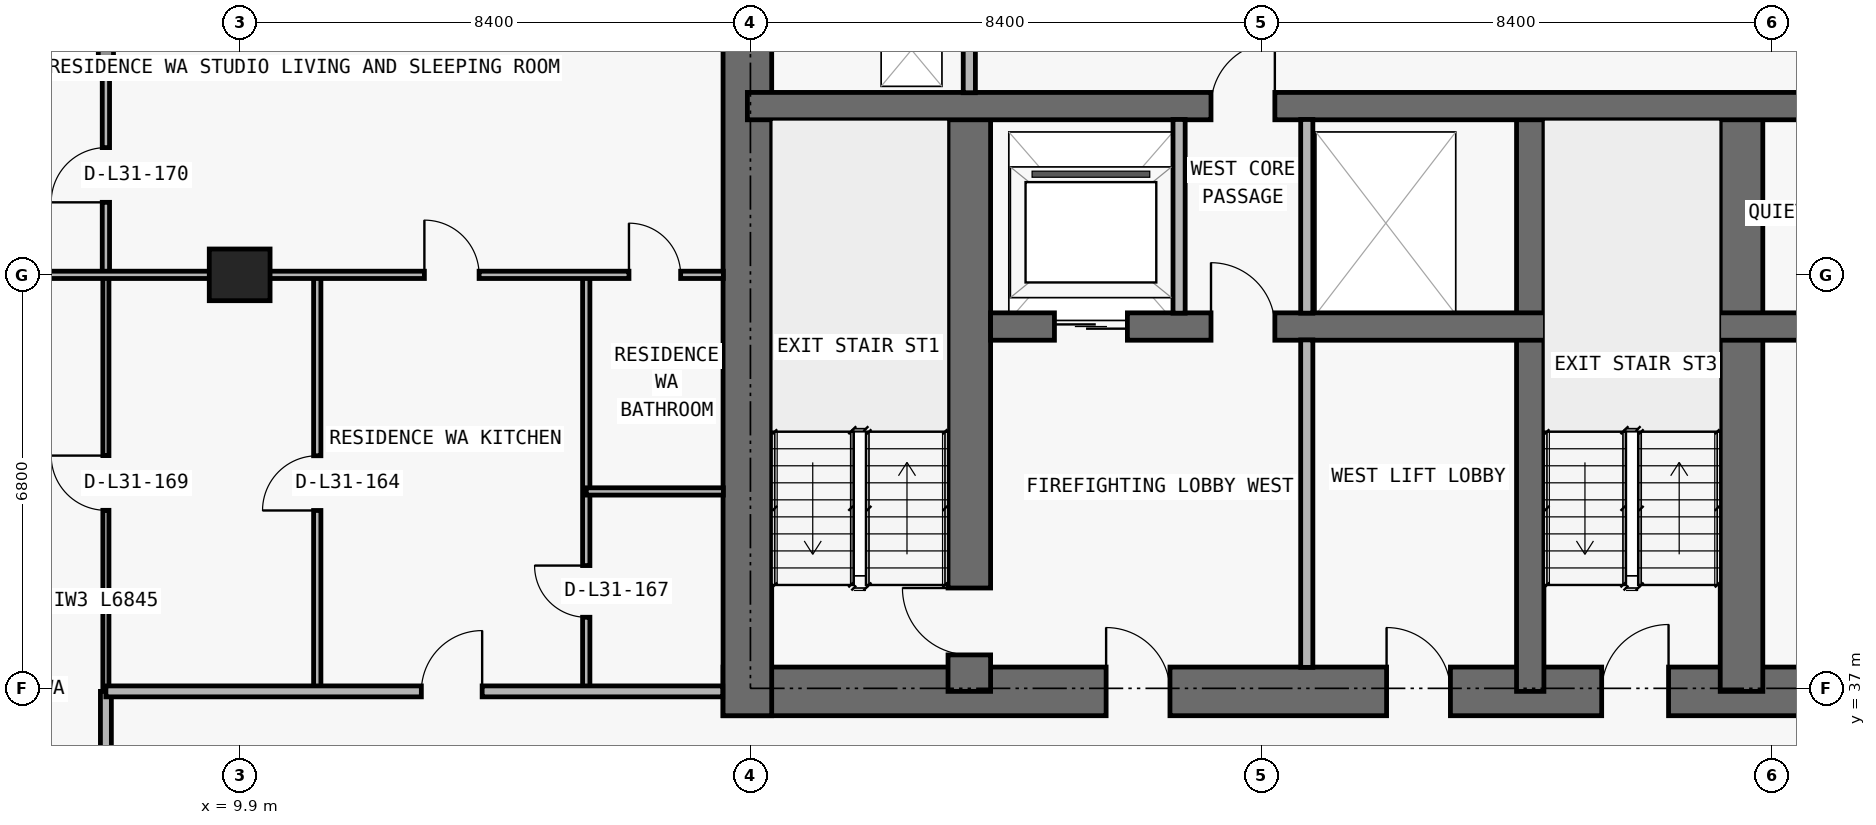
"""IFC4 building model, lengths in metres.
Left out: names, types, materials, properties, quantities, classifications, styles, units other than length and angle.
Written with IfcOpenShell. Run it as: python <this file> out.ifc"""

import sys

from ifc_helpers import new_model, si_unit, direction, frame, frame_2d, origin, origin_2d, place, context, subcontext, project, spatial, rectangle, extrude, element, fill, save


model = new_model("IFC4")
c1 = context("Model", 3, precision=1e-05, world=origin(), true_north=direction((0.0, 1.0)))
c2 = subcontext(c1, "Body", "Model", "MODEL_VIEW")
j1 = project(units=[si_unit("LENGTHUNIT", "METRE"), si_unit("PLANEANGLEUNIT", "RADIAN")], contexts=[c1])
p1 = place(None, origin())
s1 = spatial("IfcSite", under=j1, at=p1, CompositionType="ELEMENT")
p2 = place(p1, origin())
s2 = spatial("IfcBuilding", under=s1, at=p2, CompositionType="ELEMENT")
p3 = place(p2, frame((0.0, 0.0, 115.8)))
s3 = spatial("IfcBuildingStorey", under=s2, at=p3, CompositionType="ELEMENT", Elevation=115.8)
p4 = place(p3, frame((9.9, 43.8, 0.0), z_axis=(0.0, 0.0, 1.0), x_axis=(1.0, 0.0, 0.0)))
e1 = element("IfcColumn", 1, at=p4, inside=s3, PredefinedType="COLUMN", context=c2, shape_type="SweptSolid", body=[
    extrude(rectangle(XDim=1.0, YDim=0.85, at=origin_2d()), origin(), (0.0, 0.0, 1.0), 3.05),
])
p5 = place(p3, frame((17.85, 36.95, 0.0), z_axis=(0.0, 0.0, 1.0), x_axis=(1.0, 0.0, 0.0)))
e2 = element("IfcWall", 2, at=p5, inside=s3, PredefinedType="SHEAR", context=c2, shape_type="SweptSolid", body=[
    extrude(rectangle(XDim=42.1, YDim=0.8, at=frame_2d((21.05, 0.0))), origin(), (0.0, 0.0, 1.0), 3.05),
])
p6 = place(p5, frame((14.45, 0.0, 0.0)))
e3 = element("IfcOpeningElement", 3, at=p6, cuts=e2, PredefinedType="OPENING", context=c2, shape_type="SweptSolid", body=[
    extrude(rectangle(XDim=1.1, YDim=2.15, at=frame_2d((0.55, 1.075))), frame((0.0, 0.41, 0.0), z_axis=(0.0, -1.0, 0.0), x_axis=(1.0, 0.0, 0.0)), (0.0, 0.0, 1.0), 0.82),
])
p7 = place(p5, frame((6.3, 0.0, 0.0)))
e4 = element("IfcOpeningElement", 4, at=p7, cuts=e2, PredefinedType="OPENING", context=c2, shape_type="SweptSolid", body=[
    extrude(rectangle(XDim=1.05, YDim=2.15, at=frame_2d((0.525, 1.075))), frame((0.0, 0.41, 0.0), z_axis=(0.0, -1.0, 0.0), x_axis=(1.0, 0.0, 0.0)), (0.0, 0.0, 1.0), 0.82),
])
p8 = place(p5, frame((34.8, 0.0, 0.0)))
e5 = element("IfcOpeningElement", 5, at=p8, cuts=e2, PredefinedType="OPENING", context=c2, shape_type="SweptSolid", body=[
    extrude(rectangle(XDim=1.05, YDim=2.15, at=frame_2d((0.525, 1.075))), frame((0.0, 0.41, 0.0), z_axis=(0.0, -1.0, 0.0), x_axis=(1.0, 0.0, 0.0)), (0.0, 0.0, 1.0), 0.82),
])
p9 = place(p5, frame((10.913, 0.0, 0.0)))
e6 = element("IfcOpeningElement", 6, at=p9, cuts=e2, PredefinedType="OPENING", context=c2, shape_type="SweptSolid", body=[
    extrude(rectangle(XDim=1.05, YDim=2.15, at=frame_2d((0.525, 1.075))), frame((0.0, 0.41, 0.0), z_axis=(0.0, -1.0, 0.0), x_axis=(1.0, 0.0, 0.0)), (0.0, 0.0, 1.0), 0.82),
])
p10 = place(p5, frame((24.15, 0.0, 0.0)))
e7 = element("IfcOpeningElement", 7, at=p10, cuts=e2, PredefinedType="OPENING", context=c2, shape_type="SweptSolid", body=[
    extrude(rectangle(XDim=1.05, YDim=2.15, at=frame_2d((0.525, 1.075))), frame((0.0, 0.41, 0.0), z_axis=(0.0, -1.0, 0.0), x_axis=(1.0, 0.0, 0.0)), (0.0, 0.0, 1.0), 0.82),
])
p11 = place(p3, frame((18.25, 36.55, 0.0), z_axis=(0.0, 0.0, 1.0), x_axis=(0.0, 1.0, 0.0)))
e8 = element("IfcWall", 8, at=p11, inside=s3, PredefinedType="SHEAR", context=c2, shape_type="SweptSolid", body=[
    extrude(rectangle(XDim=14.05, YDim=0.8, at=frame_2d((7.025, 0.0))), origin(), (0.0, 0.0, 1.0), 3.05),
])
p12 = place(p3, frame((21.9, 36.95, 0.0), z_axis=(0.0, 0.0, 1.0), x_axis=(0.0, 1.0, 0.0)))
e9 = element("IfcWall", 9, at=p12, inside=s3, PredefinedType="SHEAR", context=c2, shape_type="SweptSolid", body=[
    extrude(rectangle(XDim=9.625, YDim=0.7, at=frame_2d((4.812, 0.0))), origin(), (0.0, 0.0, 1.0), 3.05),
])
p13 = place(p12, frame((0.6, 0.0, 0.0)))
e10 = element("IfcOpeningElement", 10, at=p13, cuts=e9, PredefinedType="OPENING", context=c2, shape_type="SweptSolid", body=[
    extrude(rectangle(XDim=1.1, YDim=2.15, at=frame_2d((0.55, 1.075))), frame((0.0, 0.36, 0.0), z_axis=(0.0, -1.0, 0.0), x_axis=(1.0, 0.0, 0.0)), (0.0, 0.0, 1.0), 0.72),
])
p14 = place(p3, frame((31.125, 36.95, 0.0), z_axis=(0.0, 0.0, 1.0), x_axis=(0.0, 1.0, 0.0)))
e11 = element("IfcWall", 11, at=p14, inside=s3, PredefinedType="SHEAR", context=c2, shape_type="SweptSolid", body=[
    extrude(rectangle(XDim=9.625, YDim=0.45, at=frame_2d((4.812, 0.0))), origin(), (0.0, 0.0, 1.0), 3.05),
])
p15 = place(p3, frame((34.6, 36.95, 0.0), z_axis=(0.0, 0.0, 1.0), x_axis=(0.0, 1.0, 0.0)))
e12 = element("IfcWall", 12, at=p15, inside=s3, PredefinedType="SHEAR", context=c2, shape_type="SweptSolid", body=[
    extrude(rectangle(XDim=9.625, YDim=0.7, at=frame_2d((4.812, 0.0))), origin(), (0.0, 0.0, 1.0), 3.05),
])
p16 = place(p3, frame((22.25, 42.95, 0.0), z_axis=(0.0, 0.0, 1.0), x_axis=(1.0, 0.0, 0.0)))
e13 = element("IfcWall", 13, at=p16, inside=s3, PredefinedType="SHEAR", context=c2, shape_type="SweptSolid", body=[
    extrude(rectangle(XDim=33.3, YDim=0.45, at=frame_2d((16.65, 0.0))), origin(), (0.0, 0.0, 1.0), 3.05),
])
p17 = place(p16, frame((1.05, 0.0, 0.0)))
e14 = element("IfcOpeningElement", 14, at=p17, cuts=e13, PredefinedType="OPENING", context=c2, shape_type="SweptSolid", body=[
    extrude(rectangle(XDim=1.2, YDim=2.2, at=frame_2d((0.6, 1.1))), frame((0.0, 0.235, 0.0), z_axis=(0.0, -1.0, 0.0), x_axis=(1.0, 0.0, 0.0)), (0.0, 0.0, 1.0), 0.47),
])
p18 = place(p16, frame((31.05, 0.0, 0.0)))
e15 = element("IfcOpeningElement", 15, at=p18, cuts=e13, PredefinedType="OPENING", context=c2, shape_type="SweptSolid", body=[
    extrude(rectangle(XDim=1.2, YDim=2.2, at=frame_2d((0.6, 1.1))), frame((0.0, 0.235, 0.0), z_axis=(0.0, -1.0, 0.0), x_axis=(1.0, 0.0, 0.0)), (0.0, 0.0, 1.0), 0.47),
])
p19 = place(p16, frame((21.4, 0.0, 0.0)))
e16 = element("IfcOpeningElement", 16, at=p19, cuts=e13, PredefinedType="OPENING", context=c2, shape_type="SweptSolid", body=[
    extrude(rectangle(XDim=1.1, YDim=2.2, at=frame_2d((0.55, 1.1))), frame((0.0, 0.235, 0.0), z_axis=(0.0, -1.0, 0.0), x_axis=(1.0, 0.0, 0.0)), (0.0, 0.0, 1.0), 0.47),
])
p20 = place(p16, frame((24.0, 0.0, 0.0)))
e17 = element("IfcOpeningElement", 17, at=p20, cuts=e13, PredefinedType="OPENING", context=c2, shape_type="SweptSolid", body=[
    extrude(rectangle(XDim=1.1, YDim=2.2, at=frame_2d((0.55, 1.1))), frame((0.0, 0.235, 0.0), z_axis=(0.0, -1.0, 0.0), x_axis=(1.0, 0.0, 0.0)), (0.0, 0.0, 1.0), 0.47),
])
p21 = place(p16, frame((3.625, 0.0, 0.0)))
e18 = element("IfcOpeningElement", 18, at=p21, cuts=e13, PredefinedType="OPENING", context=c2, shape_type="SweptSolid", body=[
    extrude(rectangle(XDim=1.05, YDim=2.15, at=frame_2d((0.525, 1.075))), frame((0.0, 0.235, 0.0), z_axis=(0.0, -1.0, 0.0), x_axis=(1.0, 0.0, 0.0)), (0.0, 0.0, 1.0), 0.47),
])
p22 = place(p16, frame((28.675, 0.0, 0.0)))
e19 = element("IfcOpeningElement", 19, at=p22, cuts=e13, PredefinedType="OPENING", context=c2, shape_type="SweptSolid", body=[
    extrude(rectangle(XDim=1.05, YDim=2.15, at=frame_2d((0.525, 1.075))), frame((0.0, 0.235, 0.0), z_axis=(0.0, -1.0, 0.0), x_axis=(1.0, 0.0, 0.0)), (0.0, 0.0, 1.0), 0.47),
])
p23 = place(p16, frame((15.975, 0.0, 0.0)))
e20 = element("IfcOpeningElement", 20, at=p23, cuts=e13, PredefinedType="OPENING", context=c2, shape_type="SweptSolid", body=[
    extrude(rectangle(XDim=1.0, YDim=2.2, at=frame_2d((0.5, 1.1))), frame((0.0, 0.235, 0.0), z_axis=(0.0, -1.0, 0.0), x_axis=(1.0, 0.0, 0.0)), (0.0, 0.0, 1.0), 0.47),
])
p24 = place(p3, frame((18.25, 46.575, 0.0), z_axis=(0.0, 0.0, 1.0), x_axis=(1.0, 0.0, 0.0)))
e21 = element("IfcWall", 21, at=p24, inside=s3, PredefinedType="SHEAR", context=c2, shape_type="SweptSolid", body=[
    extrude(rectangle(XDim=41.3, YDim=0.45, at=frame_2d((20.65, 0.0))), origin(), (0.0, 0.0, 1.0), 3.05),
])
p25 = place(p24, frame((7.625, 0.0, 0.0)))
e22 = element("IfcOpeningElement", 22, at=p25, cuts=e21, PredefinedType="OPENING", context=c2, shape_type="SweptSolid", body=[
    extrude(rectangle(XDim=1.05, YDim=2.15, at=frame_2d((0.525, 1.075))), frame((0.0, 0.235, 0.0), z_axis=(0.0, -1.0, 0.0), x_axis=(1.0, 0.0, 0.0)), (0.0, 0.0, 1.0), 0.47),
])
p26 = place(p24, frame((32.675, 0.0, 0.0)))
e23 = element("IfcOpeningElement", 23, at=p26, cuts=e21, PredefinedType="OPENING", context=c2, shape_type="SweptSolid", body=[
    extrude(rectangle(XDim=1.05, YDim=2.15, at=frame_2d((0.525, 1.075))), frame((0.0, 0.235, 0.0), z_axis=(0.0, -1.0, 0.0), x_axis=(1.0, 0.0, 0.0)), (0.0, 0.0, 1.0), 0.47),
])
p27 = place(p3, frame((4.05, 47.2, 0.0), z_axis=(0.0, 0.0, 1.0), x_axis=(1.0, 0.0, 0.0)))
e24 = element("IfcWall", 24, at=p27, inside=s3, PredefinedType="ELEMENTEDWALL", context=c2, shape_type="SweptSolid", body=[
    extrude(rectangle(XDim=3.65, YDim=0.25, at=frame_2d((1.825, 0.0))), origin(), (0.0, 0.0, 1.0), 3.05),
])
p28 = place(p3, frame((7.7, 47.2, 0.0), z_axis=(0.0, 0.0, 1.0), x_axis=(0.0, 1.0, 0.0)))
e25 = element("IfcWall", 25, at=p28, inside=s3, PredefinedType="ELEMENTEDWALL", context=c2, shape_type="SweptSolid", body=[
    extrude(rectangle(XDim=3.25, YDim=0.25, at=frame_2d((1.625, 0.0))), origin(), (0.0, 0.0, 1.0), 3.05),
])
p29 = place(p3, frame((7.7, 33.605, 0.0), z_axis=(0.0, 0.0, 1.0), x_axis=(0.0, 1.0, 0.0)))
e26 = element("IfcWall", 26, at=p29, inside=s3, PredefinedType="PARTITIONING", context=c2, shape_type="SweptSolid", body=[
    extrude(rectangle(XDim=3.345, YDim=0.18, at=frame_2d((1.672, 0.0))), origin(), (0.0, 0.0, 1.0), 3.05),
])
p30 = place(p3, frame((7.7, 36.955, 0.0), z_axis=(0.0, 0.0, 1.0), x_axis=(0.0, 1.0, 0.0)))
e27 = element("IfcWall", 27, at=p30, inside=s3, PredefinedType="MOVABLE", context=c2, shape_type="SweptSolid", body=[
    extrude(rectangle(XDim=6.845, YDim=0.1, at=frame_2d((3.422, 0.0))), origin(), (0.0, 0.0, 1.0), 3.05),
])
p31 = place(p30, frame((2.972, 0.0, 0.0)))
e28 = element("IfcOpeningElement", 28, at=p31, cuts=e27, PredefinedType="OPENING", context=c2, shape_type="SweptSolid", body=[
    extrude(rectangle(XDim=0.9, YDim=2.15, at=frame_2d((0.45, 1.075))), frame((0.0, 0.06, 0.0), z_axis=(0.0, -1.0, 0.0), x_axis=(1.0, 0.0, 0.0)), (0.0, 0.0, 1.0), 0.12),
])
p32 = place(p3, frame((7.7, 43.805, 0.0), z_axis=(0.0, 0.0, 1.0), x_axis=(0.0, 1.0, 0.0)))
e29 = element("IfcWall", 29, at=p32, inside=s3, PredefinedType="PARTITIONING", context=c2, shape_type="SweptSolid", body=[
    extrude(rectangle(XDim=3.275, YDim=0.12, at=frame_2d((1.638, 0.0))), origin(), (0.0, 0.0, 1.0), 3.05),
])
p33 = place(p32, frame((1.188, 0.0, 0.0)))
e30 = element("IfcOpeningElement", 30, at=p33, cuts=e29, PredefinedType="OPENING", context=c2, shape_type="SweptSolid", body=[
    extrude(rectangle(XDim=0.9, YDim=2.15, at=frame_2d((0.45, 1.075))), frame((0.0, 0.07, 0.0), z_axis=(0.0, -1.0, 0.0), x_axis=(1.0, 0.0, 0.0)), (0.0, 0.0, 1.0), 0.14),
])
p34 = place(p3, frame((11.176, 36.95, 0.0), z_axis=(0.0, 0.0, 1.0), x_axis=(0.0, 1.0, 0.0)))
e31 = element("IfcWall", 31, at=p34, inside=s3, PredefinedType="PARTITIONING", context=c2, shape_type="SweptSolid", body=[
    extrude(rectangle(XDim=6.85, YDim=0.12, at=frame_2d((3.425, 0.0))), origin(), (0.0, 0.0, 1.0), 3.05),
])
p35 = place(p34, frame((2.975, 0.0, 0.0)))
e32 = element("IfcOpeningElement", 32, at=p35, cuts=e31, PredefinedType="OPENING", context=c2, shape_type="SweptSolid", body=[
    extrude(rectangle(XDim=0.9, YDim=2.15, at=frame_2d((0.45, 1.075))), frame((0.0, 0.07, 0.0), z_axis=(0.0, -1.0, 0.0), x_axis=(1.0, 0.0, 0.0)), (0.0, 0.0, 1.0), 0.14),
])
p36 = place(p3, frame((15.6, 36.95, 0.0), z_axis=(0.0, 0.0, 1.0), x_axis=(0.0, 1.0, 0.0)))
e33 = element("IfcWall", 33, at=p36, inside=s3, PredefinedType="PARTITIONING", context=c2, shape_type="SweptSolid", body=[
    extrude(rectangle(XDim=6.85, YDim=0.12, at=frame_2d((3.425, 0.0))), origin(), (0.0, 0.0, 1.0), 3.05),
])
p37 = place(p36, frame((1.219, 0.0, 0.0)))
e34 = element("IfcOpeningElement", 34, at=p37, cuts=e33, PredefinedType="OPENING", context=c2, shape_type="SweptSolid", body=[
    extrude(rectangle(XDim=0.85, YDim=2.1, at=frame_2d((0.425, 1.05))), frame((0.0, 0.07, 0.0), z_axis=(0.0, -1.0, 0.0), x_axis=(1.0, 0.0, 0.0)), (0.0, 0.0, 1.0), 0.14),
])
p38 = place(p3, frame((21.9, 46.795, 0.0), z_axis=(0.0, 0.0, 1.0), x_axis=(0.0, 1.0, 0.0)))
e35 = element("IfcWall", 35, at=p38, inside=s3, PredefinedType="PARTITIONING", context=c2, shape_type="SweptSolid", body=[
    extrude(rectangle(XDim=3.16, YDim=0.2, at=frame_2d((1.58, 0.0))), origin(), (0.0, 0.0, 1.0), 3.05),
])
p39 = place(p3, frame((25.35, 43.17, 0.0), z_axis=(0.0, 0.0, 1.0), x_axis=(0.0, 1.0, 0.0)))
e36 = element("IfcWall", 36, at=p39, inside=s3, PredefinedType="PARTITIONING", context=c2, shape_type="SweptSolid", body=[
    extrude(rectangle(XDim=3.185, YDim=0.2, at=frame_2d((1.593, 0.0))), origin(), (0.0, 0.0, 1.0), 3.05),
])
p40 = place(p3, frame((27.45, 37.345, 0.0), z_axis=(0.0, 0.0, 1.0), x_axis=(0.0, 1.0, 0.0)))
e37 = element("IfcWall", 37, at=p40, inside=s3, PredefinedType="PARTITIONING", context=c2, shape_type="SweptSolid", body=[
    extrude(rectangle(XDim=5.385, YDim=0.2, at=frame_2d((2.692, 0.0))), origin(), (0.0, 0.0, 1.0), 3.05),
])
p41 = place(p3, frame((27.45, 43.17, 0.0), z_axis=(0.0, 0.0, 1.0), x_axis=(0.0, 1.0, 0.0)))
e38 = element("IfcWall", 38, at=p41, inside=s3, PredefinedType="PARTITIONING", context=c2, shape_type="SweptSolid", body=[
    extrude(rectangle(XDim=3.185, YDim=0.2, at=frame_2d((1.593, 0.0))), origin(), (0.0, 0.0, 1.0), 3.05),
])
p42 = place(p3, frame((7.7, 36.95, 0.0), z_axis=(0.0, 0.0, 1.0), x_axis=(1.0, 0.0, 0.0)))
e39 = element("IfcWall", 39, at=p42, inside=s3, PredefinedType="PARTITIONING", context=c2, shape_type="SweptSolid", body=[
    extrude(rectangle(XDim=10.145, YDim=0.18, at=frame_2d((5.073, 0.0))), origin(), (0.0, 0.0, 1.0), 3.05),
])
p43 = place(p42, frame((5.188, 0.0, 0.0)))
e40 = element("IfcOpeningElement", 40, at=p43, cuts=e39, PredefinedType="OPENING", context=c2, shape_type="SweptSolid", body=[
    extrude(rectangle(XDim=1.0, YDim=2.2, at=frame_2d((0.5, 1.1))), frame((0.0, 0.1, 0.0), z_axis=(0.0, -1.0, 0.0), x_axis=(1.0, 0.0, 0.0)), (0.0, 0.0, 1.0), 0.2),
])
p44 = place(p3, frame((15.6, 40.238, 0.0), z_axis=(0.0, 0.0, 1.0), x_axis=(1.0, 0.0, 0.0)))
e41 = element("IfcWall", 41, at=p44, inside=s3, PredefinedType="PARTITIONING", context=c2, shape_type="SweptSolid", body=[
    extrude(rectangle(XDim=2.255, YDim=0.12, at=frame_2d((1.127, 0.0))), origin(), (0.0, 0.0, 1.0), 3.05),
])
p45 = place(p3, frame((4.195, 43.8, 0.0), z_axis=(0.0, 0.0, 1.0), x_axis=(1.0, 0.0, 0.0)))
e42 = element("IfcWall", 42, at=p45, inside=s3, PredefinedType="PARTITIONING", context=c2, shape_type="SweptSolid", body=[
    extrude(rectangle(XDim=13.66, YDim=0.12, at=frame_2d((6.83, 0.0))), origin(), (0.0, 0.0, 1.0), 2.339),
])
p46 = place(p45, frame((8.743, 0.0, 0.0)))
e43 = element("IfcOpeningElement", 43, at=p46, cuts=e42, PredefinedType="OPENING", context=c2, shape_type="SweptSolid", body=[
    extrude(rectangle(XDim=0.9, YDim=2.15, at=frame_2d((0.45, 1.075))), frame((0.0, 0.07, 0.0), z_axis=(0.0, -1.0, 0.0), x_axis=(1.0, 0.0, 0.0)), (0.0, 0.0, 1.0), 0.14),
])
p47 = place(p45, frame((12.107, 0.0, 0.0)))
e44 = element("IfcOpeningElement", 44, at=p47, cuts=e42, PredefinedType="OPENING", context=c2, shape_type="SweptSolid", body=[
    extrude(rectangle(XDim=0.85, YDim=2.1, at=frame_2d((0.425, 1.05))), frame((0.0, 0.07, 0.0), z_axis=(0.0, -1.0, 0.0), x_axis=(1.0, 0.0, 0.0)), (0.0, 0.0, 1.0), 0.14),
])
p48 = place(p17, origin())
e45 = element("IfcDoor", 45, at=p48, inside=s3, OperationType="DOUBLE_DOOR_SLIDING", PredefinedType="DOOR", context=c2, shape_type="SweptSolid", body=[
    extrude(rectangle(XDim=1.2, YDim=2.2, at=frame_2d((0.6, 1.1))), frame((0.0, 0.025, 0.0), z_axis=(0.0, -1.0, 0.0), x_axis=(1.0, 0.0, 0.0)), (0.0, 0.0, 1.0), 0.05),
])
fill(e14, e45)
p49 = place(p6, origin())
e46 = element("IfcDoor", 46, at=p49, inside=s3, OperationType="SINGLE_SWING_RIGHT", PredefinedType="DOOR", context=c2, shape_type="SweptSolid", body=[
    extrude(rectangle(XDim=1.1, YDim=2.15, at=frame_2d((0.55, 1.075))), frame((0.0, 0.025, 0.0), z_axis=(0.0, -1.0, 0.0), x_axis=(1.0, 0.0, 0.0)), (0.0, 0.0, 1.0), 0.05),
])
fill(e3, e46)
p50 = place(p7, origin())
e47 = element("IfcDoor", 47, at=p50, inside=s3, OperationType="SINGLE_SWING_LEFT", PredefinedType="DOOR", context=c2, shape_type="SweptSolid", body=[
    extrude(rectangle(XDim=1.05, YDim=2.15, at=frame_2d((0.525, 1.075))), frame((0.0, 0.025, 0.0), z_axis=(0.0, -1.0, 0.0), x_axis=(1.0, 0.0, 0.0)), (0.0, 0.0, 1.0), 0.05),
])
fill(e4, e47)
p51 = place(p13, origin())
e48 = element("IfcDoor", 48, at=p51, inside=s3, OperationType="SINGLE_SWING_RIGHT", PredefinedType="DOOR", context=c2, shape_type="SweptSolid", body=[
    extrude(rectangle(XDim=1.1, YDim=2.15, at=frame_2d((0.55, 1.075))), frame((0.0, 0.025, 0.0), z_axis=(0.0, -1.0, 0.0), x_axis=(1.0, 0.0, 0.0)), (0.0, 0.0, 1.0), 0.05),
])
fill(e10, e48)
p52 = place(p21, origin())
e49 = element("IfcDoor", 49, at=p52, inside=s3, OperationType="SINGLE_SWING_LEFT", PredefinedType="DOOR", context=c2, shape_type="SweptSolid", body=[
    extrude(rectangle(XDim=1.05, YDim=2.15, at=frame_2d((0.525, 1.075))), frame((0.0, 0.025, 0.0), z_axis=(0.0, -1.0, 0.0), x_axis=(1.0, 0.0, 0.0)), (0.0, 0.0, 1.0), 0.05),
])
fill(e18, e49)
p53 = place(p9, origin())
e50 = element("IfcDoor", 50, at=p53, inside=s3, OperationType="SINGLE_SWING_LEFT", PredefinedType="DOOR", context=c2, shape_type="SweptSolid", body=[
    extrude(rectangle(XDim=1.05, YDim=2.15, at=frame_2d((0.525, 1.075))), frame((0.0, 0.025, 0.0), z_axis=(0.0, -1.0, 0.0), x_axis=(1.0, 0.0, 0.0)), (0.0, 0.0, 1.0), 0.05),
])
fill(e6, e50)
p54 = place(p25, origin())
e51 = element("IfcDoor", 51, at=p54, inside=s3, OperationType="SINGLE_SWING_RIGHT", PredefinedType="DOOR", context=c2, shape_type="SweptSolid", body=[
    extrude(rectangle(XDim=1.05, YDim=2.15, at=frame_2d((0.525, 1.075))), frame((0.0, 0.025, 0.0), z_axis=(0.0, -1.0, 0.0), x_axis=(1.0, 0.0, 0.0)), (0.0, 0.0, 1.0), 0.05),
])
fill(e22, e51)
p55 = place(p35, origin())
e52 = element("IfcDoor", 52, at=p55, inside=s3, OperationType="SINGLE_SWING_LEFT", PredefinedType="DOOR", context=c2, shape_type="SweptSolid", body=[
    extrude(rectangle(XDim=0.9, YDim=2.15, at=frame_2d((0.45, 1.075))), frame((0.0, 0.025, 0.0), z_axis=(0.0, -1.0, 0.0), x_axis=(1.0, 0.0, 0.0)), (0.0, 0.0, 1.0), 0.05),
])
fill(e32, e52)
p56 = place(p43, origin())
e53 = element("IfcDoor", 53, at=p56, inside=s3, OperationType="SINGLE_SWING_RIGHT", PredefinedType="DOOR", context=c2, shape_type="SweptSolid", body=[
    extrude(rectangle(XDim=1.0, YDim=2.2, at=frame_2d((0.5, 1.1))), frame((0.0, 0.025, 0.0), z_axis=(0.0, -1.0, 0.0), x_axis=(1.0, 0.0, 0.0)), (0.0, 0.0, 1.0), 0.05),
])
fill(e40, e53)
p57 = place(p46, origin())
e54 = element("IfcDoor", 54, at=p57, inside=s3, OperationType="SINGLE_SWING_LEFT", PredefinedType="DOOR", context=c2, shape_type="SweptSolid", body=[
    extrude(rectangle(XDim=0.9, YDim=2.15, at=frame_2d((0.45, 1.075))), frame((0.0, 0.025, 0.0), z_axis=(0.0, -1.0, 0.0), x_axis=(1.0, 0.0, 0.0)), (0.0, 0.0, 1.0), 0.05),
])
fill(e43, e54)
p58 = place(p37, origin())
e55 = element("IfcDoor", 55, at=p58, inside=s3, OperationType="SINGLE_SWING_RIGHT", PredefinedType="DOOR", context=c2, shape_type="SweptSolid", body=[
    extrude(rectangle(XDim=0.85, YDim=2.1, at=frame_2d((0.425, 1.05))), frame((0.0, 0.025, 0.0), z_axis=(0.0, -1.0, 0.0), x_axis=(1.0, 0.0, 0.0)), (0.0, 0.0, 1.0), 0.05),
])
fill(e34, e55)
p59 = place(p47, origin())
e56 = element("IfcDoor", 56, at=p59, inside=s3, OperationType="SINGLE_SWING_LEFT", PredefinedType="DOOR", context=c2, shape_type="SweptSolid", body=[
    extrude(rectangle(XDim=0.85, YDim=2.1, at=frame_2d((0.425, 1.05))), frame((0.0, 0.025, 0.0), z_axis=(0.0, -1.0, 0.0), x_axis=(1.0, 0.0, 0.0)), (0.0, 0.0, 1.0), 0.05),
])
fill(e44, e56)
p60 = place(p31, origin())
e57 = element("IfcDoor", 57, at=p60, inside=s3, OperationType="SINGLE_SWING_RIGHT", PredefinedType="DOOR", context=c2, shape_type="SweptSolid", body=[
    extrude(rectangle(XDim=0.9, YDim=2.15, at=frame_2d((0.45, 1.075))), frame((0.0, 0.025, 0.0), z_axis=(0.0, -1.0, 0.0), x_axis=(1.0, 0.0, 0.0)), (0.0, 0.0, 1.0), 0.05),
])
fill(e28, e57)
p61 = place(p33, origin())
e58 = element("IfcDoor", 58, at=p61, inside=s3, OperationType="SINGLE_SWING_LEFT", PredefinedType="DOOR", context=c2, shape_type="SweptSolid", body=[
    extrude(rectangle(XDim=0.9, YDim=2.15, at=frame_2d((0.45, 1.075))), frame((0.0, 0.025, 0.0), z_axis=(0.0, -1.0, 0.0), x_axis=(1.0, 0.0, 0.0)), (0.0, 0.0, 1.0), 0.05),
])
fill(e30, e58)
save(model, sys.argv[1])
